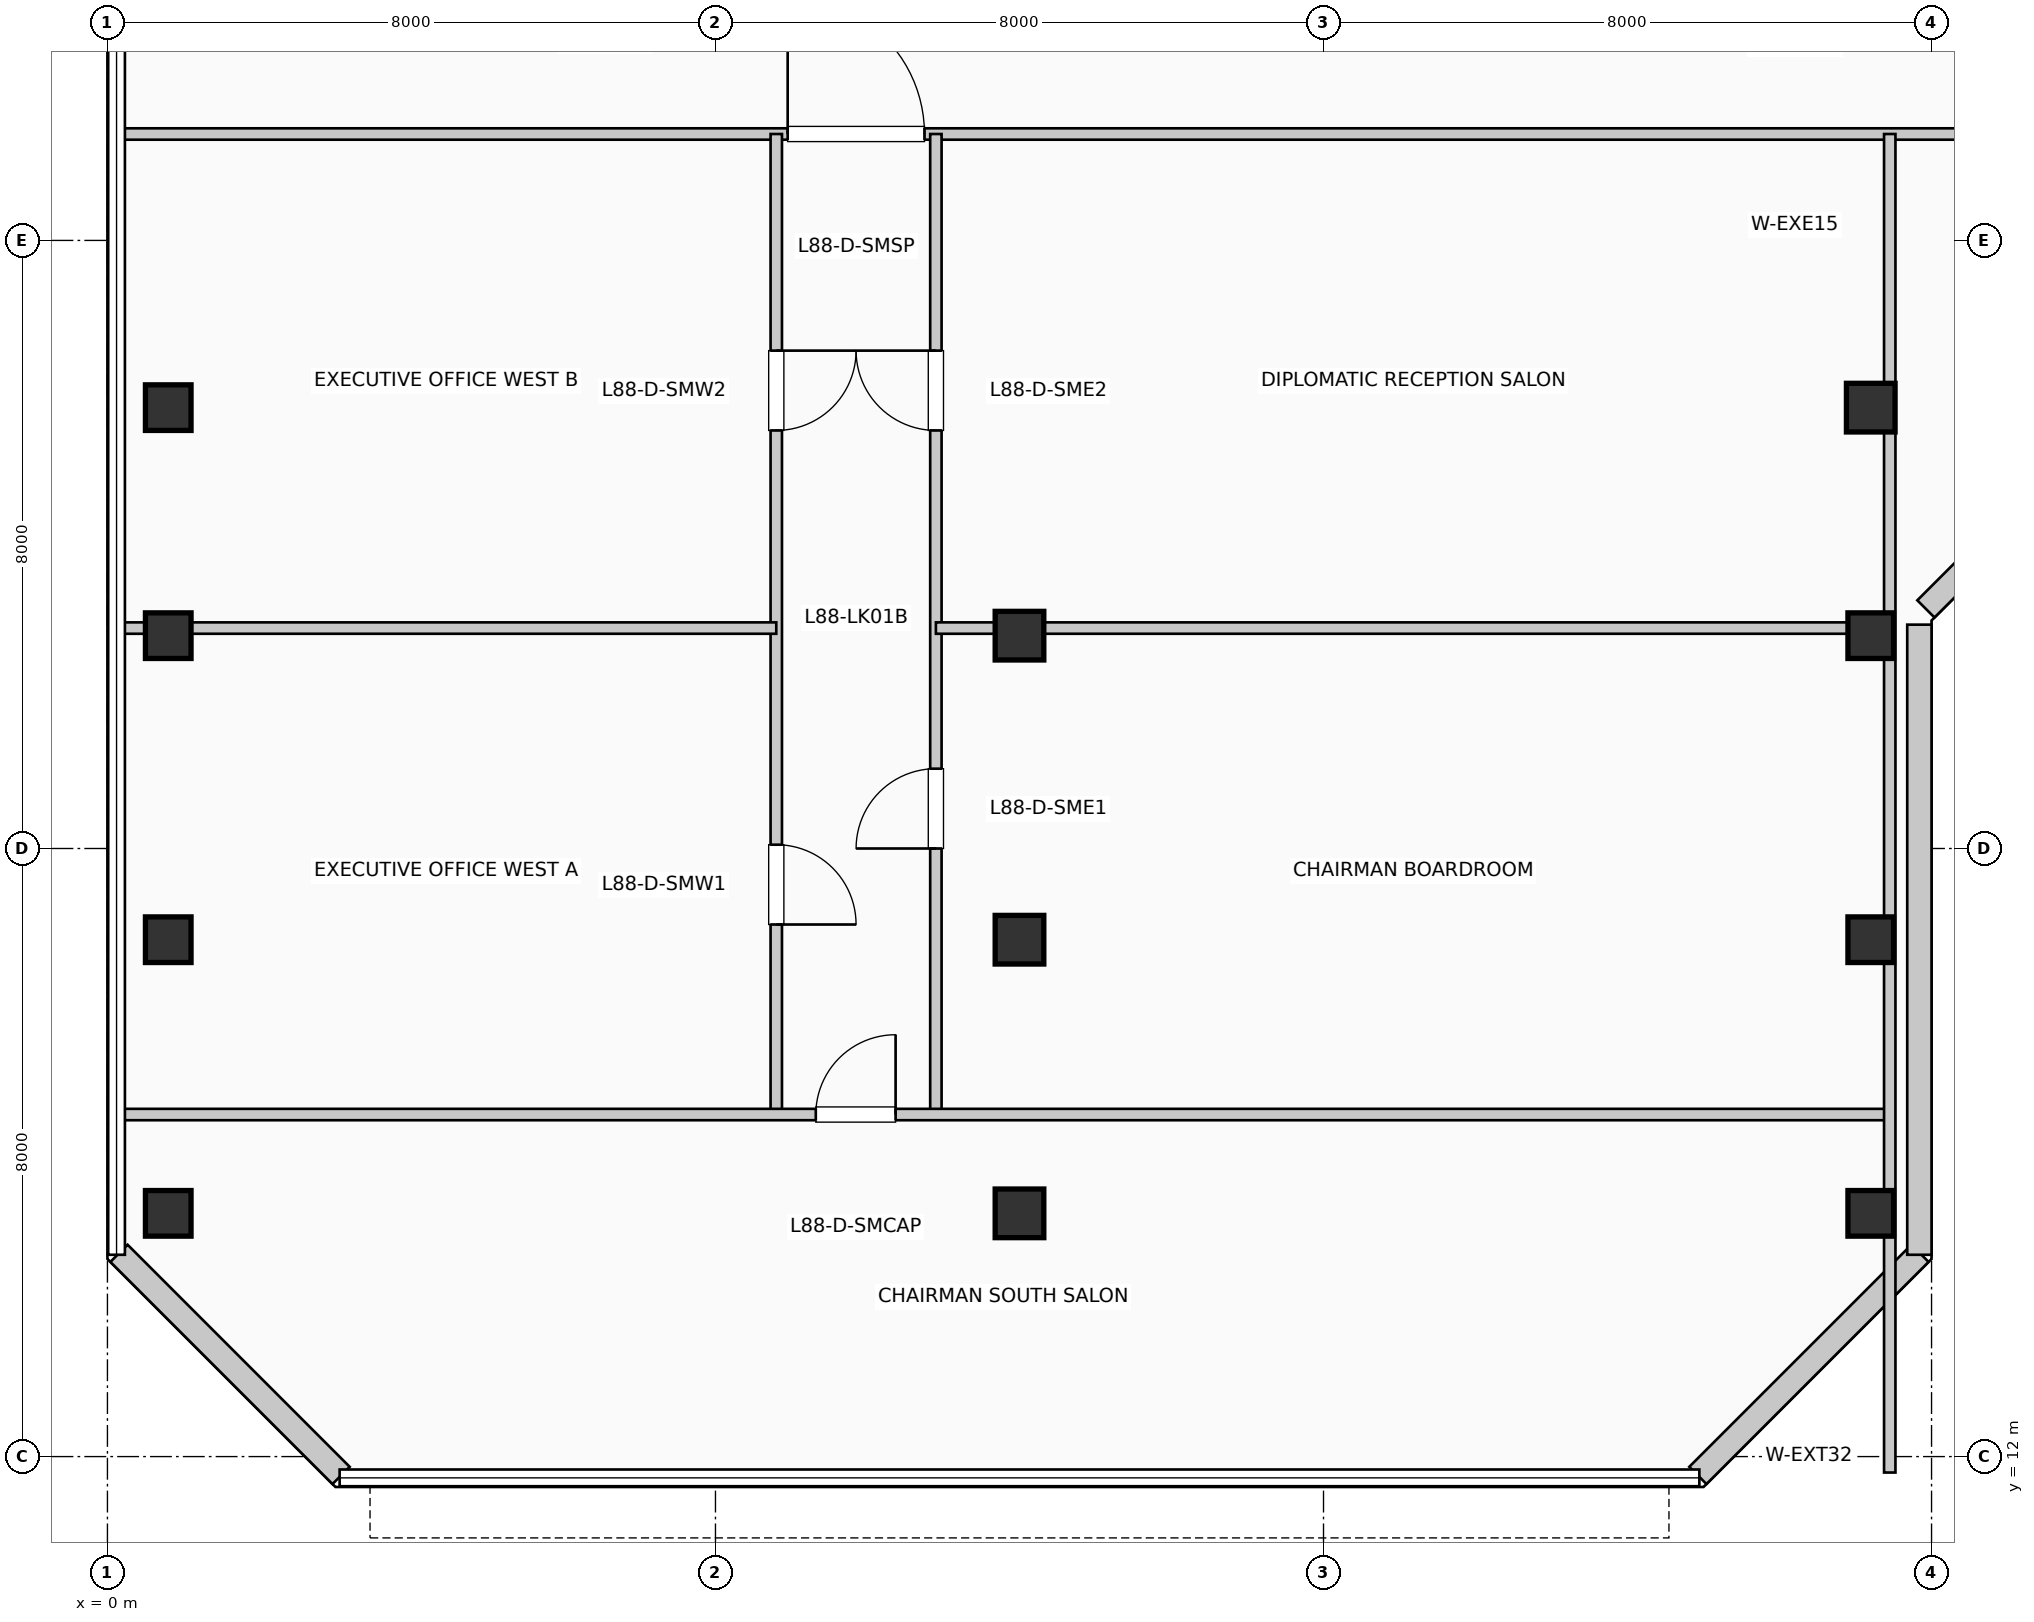
"""IFC4 building model, lengths in metres.
Left out: names, types, materials, properties, quantities, classifications, styles, units other than length and angle.
Written with IfcOpenShell. Run it as: python <this file> out.ifc"""

import sys

from ifc_helpers import new_model, si_unit, direction, frame, frame_2d, origin, origin_2d, place, context, subcontext, project, spatial, rectangle, extrude, element, fill, save


model = new_model("IFC4")
c1 = context("Model", 3, precision=1e-05, world=origin(), true_north=direction((0.0, 1.0)))
c2 = subcontext(c1, "Body", "Model", "MODEL_VIEW")
j1 = project(units=[si_unit("LENGTHUNIT", "METRE"), si_unit("PLANEANGLEUNIT", "RADIAN")], contexts=[c1])
p1 = place(None, origin())
s1 = spatial("IfcSite", under=j1, at=p1, CompositionType="ELEMENT")
p2 = place(p1, origin())
s2 = spatial("IfcBuilding", under=s1, at=p2, CompositionType="ELEMENT")
p3 = place(p2, frame((0.0, 0.0, 361.35)))
s3 = spatial("IfcBuildingStorey", under=s2, at=p3, CompositionType="ELEMENT", Elevation=361.35)
for number, where, z_axis, x_axis in (
    (1, (0.8, 15.2, 0.0), (0.0, 0.0, 1.0), (1.0, 0.0, 0.0)),
    (2, (0.8, 18.8, 0.0), (0.0, 0.0, 1.0), (1.0, 0.0, 0.0)),
    (3, (0.8, 22.8, 0.0), (0.0, 0.0, 1.0), (1.0, 0.0, 0.0)),
    (4, (0.8, 25.8, 0.0), (0.0, 0.0, 1.0), (1.0, 0.0, 0.0)),
):
    element("IfcColumn", number, at=place(p3, frame(where, z_axis=z_axis, x_axis=x_axis)), inside=s3, PredefinedType="COLUMN", context=c2, shape_type="SweptSolid", body=[
        extrude(rectangle(XDim=0.6, YDim=0.6, at=origin_2d()), origin(), (0.0, 0.0, 1.0), 4.62),
    ])
for number, where, z_axis, x_axis in (
    (5, (12.0, 15.2, 0.0), (0.0, 0.0, 1.0), (1.0, 0.0, 0.0)),
    (6, (12.0, 18.8, 0.0), (0.0, 0.0, 1.0), (1.0, 0.0, 0.0)),
    (7, (12.0, 22.8, 0.0), (0.0, 0.0, 1.0), (1.0, 0.0, 0.0)),
):
    element("IfcColumn", number, at=place(p3, frame(where, z_axis=z_axis, x_axis=x_axis)), inside=s3, PredefinedType="COLUMN", context=c2, shape_type="SweptSolid", body=[
        extrude(rectangle(XDim=0.64, YDim=0.64, at=origin_2d()), origin(), (0.0, 0.0, 1.0), 4.62),
    ])
for number, where, z_axis, x_axis in (
    (8, (23.2, 15.2, 0.0), (0.0, 0.0, 1.0), (1.0, 0.0, 0.0)),
    (9, (23.2, 18.8, 0.0), (0.0, 0.0, 1.0), (1.0, 0.0, 0.0)),
    (10, (23.2, 22.8, 0.0), (0.0, 0.0, 1.0), (1.0, 0.0, 0.0)),
):
    element("IfcColumn", number, at=place(p3, frame(where, z_axis=z_axis, x_axis=x_axis)), inside=s3, PredefinedType="COLUMN", context=c2, shape_type="SweptSolid", body=[
        extrude(rectangle(XDim=0.6, YDim=0.6, at=origin_2d()), origin(), (0.0, 0.0, 1.0), 4.62),
    ])
p4 = place(p3, frame((23.2, 25.8, 0.0), z_axis=(0.0, 0.0, 1.0), x_axis=(1.0, 0.0, 0.0)))
e11 = element("IfcColumn", 11, at=p4, inside=s3, PredefinedType="COLUMN", context=c2, shape_type="SweptSolid", body=[
    extrude(rectangle(XDim=0.64, YDim=0.64, at=origin_2d()), origin(), (0.0, 0.0, 1.0), 4.62),
])
p5 = place(p3, frame((20.926, 11.752, 0.0), z_axis=(0.0, 0.0, 1.0), x_axis=(0.707077242712, 0.707136318428, 0.0)))
e12 = element("IfcWall", 12, at=p5, inside=s3, PredefinedType="SOLIDWALL", context=c2, shape_type="SweptSolid", body=[
    extrude(rectangle(XDim=4.133, YDim=0.32, at=frame_2d((2.066, 0.0))), origin(), (0.0, 0.0, 1.0), 4.27),
])
p6 = place(p3, frame((23.84, 14.655, 0.0), z_axis=(0.0, 0.0, 1.0), x_axis=(0.0, 1.0, 0.0)))
e13 = element("IfcWall", 13, at=p6, inside=s3, PredefinedType="SOLIDWALL", context=c2, shape_type="SweptSolid", body=[
    extrude(rectangle(XDim=8.29, YDim=0.32, at=frame_2d((4.145, 0.0))), origin(), (0.0, 0.0, 1.0), 4.27),
])
p7 = place(p3, frame((23.926, 23.152, 0.0), z_axis=(0.0, 0.0, 1.0), x_axis=(0.707106781187, 0.707106781187, 0.0)))
e14 = element("IfcWall", 14, at=p7, inside=s3, PredefinedType="SOLIDWALL", context=c2, shape_type="SweptSolid", body=[
    extrude(rectangle(XDim=2.718, YDim=0.32, at=frame_2d((1.359, 0.0))), origin(), (0.0, 0.0, 1.0), 4.27),
])
p8 = place(p3, frame((0.152, 14.674, 0.0), z_axis=(0.0, 0.0, 1.0), x_axis=(0.707077242712, -0.707136318428, 0.0)))
e15 = element("IfcWall", 15, at=p8, inside=s3, PredefinedType="SOLIDWALL", context=c2, shape_type="SweptSolid", body=[
    extrude(rectangle(XDim=4.133, YDim=0.32, at=frame_2d((2.066, 0.0))), origin(), (0.0, 0.0, 1.0), 4.27),
])
p9 = place(p3, frame((0.19, 29.4, 0.0), z_axis=(0.0, 0.0, 1.0), x_axis=(1.0, 0.0, 0.0)))
e16 = element("IfcWall", 16, at=p9, inside=s3, PredefinedType="PARTITIONING", context=c2, shape_type="SweptSolid", body=[
    extrude(rectangle(XDim=44.02, YDim=0.15, at=frame_2d((22.01, 0.0))), origin(), (0.0, 0.0, 1.0), 3.955),
])
p10 = place(p9, frame((8.76, 0.0, 0.0)))
e17 = element("IfcOpeningElement", 17, at=p10, cuts=e16, PredefinedType="OPENING", context=c2, shape_type="SweptSolid", body=[
    extrude(rectangle(XDim=1.8, YDim=2.3, at=frame_2d((0.9, 1.15))), frame((0.0, 0.085, 0.0), z_axis=(0.0, -1.0, 0.0), x_axis=(1.0, 0.0, 0.0)), (0.0, 0.0, 1.0), 0.17),
])
p11 = place(p9, frame((25.91, 0.0, 0.0)))
e18 = element("IfcOpeningElement", 18, at=p11, cuts=e16, PredefinedType="OPENING", context=c2, shape_type="SweptSolid", body=[
    extrude(rectangle(XDim=1.05, YDim=2.15, at=frame_2d((0.525, 1.075))), frame((0.0, 0.085, 0.0), z_axis=(0.0, -1.0, 0.0), x_axis=(1.0, 0.0, 0.0)), (0.0, 0.0, 1.0), 0.17),
])
p12 = place(p9, frame((36.01, 0.0, 0.0)))
e19 = element("IfcOpeningElement", 19, at=p12, cuts=e16, PredefinedType="OPENING", context=c2, shape_type="SweptSolid", body=[
    extrude(rectangle(XDim=1.05, YDim=2.15, at=frame_2d((0.525, 1.075))), frame((0.0, 0.085, 0.0), z_axis=(0.0, -1.0, 0.0), x_axis=(1.0, 0.0, 0.0)), (0.0, 0.0, 1.0), 0.17),
])
p13 = place(p3, frame((8.8, 16.5, 0.0), z_axis=(0.0, 0.0, 1.0), x_axis=(0.0, 1.0, 0.0)))
e20 = element("IfcWall", 20, at=p13, inside=s3, PredefinedType="PARTITIONING", context=c2, shape_type="SweptSolid", body=[
    extrude(rectangle(XDim=12.9, YDim=0.15, at=frame_2d((6.45, 0.0))), origin(), (0.0, 0.0, 1.0), 4.27),
])
p14 = place(p13, frame((3.55, 0.0, 0.0), z_axis=(0.0, 0.0, 1.0), x_axis=(-1.0, 0.0, 0.0)))
e21 = element("IfcOpeningElement", 21, at=p14, cuts=e20, PredefinedType="OPENING", context=c2, shape_type="SweptSolid", body=[
    extrude(rectangle(XDim=1.05, YDim=2.15, at=frame_2d((0.525, 1.075))), frame((0.0, 0.085, 0.0), z_axis=(0.0, -1.0, 0.0), x_axis=(1.0, 0.0, 0.0)), (0.0, 0.0, 1.0), 0.17),
])
p15 = place(p13, frame((10.05, 0.0, 0.0), z_axis=(0.0, 0.0, 1.0), x_axis=(-1.0, 0.0, 0.0)))
e22 = element("IfcOpeningElement", 22, at=p15, cuts=e20, PredefinedType="OPENING", context=c2, shape_type="SweptSolid", body=[
    extrude(rectangle(XDim=1.05, YDim=2.15, at=frame_2d((0.525, 1.075))), frame((0.0, 0.085, 0.0), z_axis=(0.0, -1.0, 0.0), x_axis=(1.0, 0.0, 0.0)), (0.0, 0.0, 1.0), 0.17),
])
p16 = place(p3, frame((10.9, 16.5, 0.0), z_axis=(0.0, 0.0, 1.0), x_axis=(0.0, 1.0, 0.0)))
e23 = element("IfcWall", 23, at=p16, inside=s3, PredefinedType="PARTITIONING", context=c2, shape_type="SweptSolid", body=[
    extrude(rectangle(XDim=12.9, YDim=0.15, at=frame_2d((6.45, 0.0))), origin(), (0.0, 0.0, 1.0), 4.27),
])
p17 = place(p16, frame((3.5, 0.0, 0.0)))
e24 = element("IfcOpeningElement", 24, at=p17, cuts=e23, PredefinedType="OPENING", context=c2, shape_type="SweptSolid", body=[
    extrude(rectangle(XDim=1.05, YDim=2.15, at=frame_2d((0.525, 1.075))), frame((0.0, 0.085, 0.0), z_axis=(0.0, -1.0, 0.0), x_axis=(1.0, 0.0, 0.0)), (0.0, 0.0, 1.0), 0.17),
])
p18 = place(p16, frame((9.0, 0.0, 0.0)))
e25 = element("IfcOpeningElement", 25, at=p18, cuts=e23, PredefinedType="OPENING", context=c2, shape_type="SweptSolid", body=[
    extrude(rectangle(XDim=1.05, YDim=2.15, at=frame_2d((0.525, 1.075))), frame((0.0, 0.085, 0.0), z_axis=(0.0, -1.0, 0.0), x_axis=(1.0, 0.0, 0.0)), (0.0, 0.0, 1.0), 0.17),
])
p19 = place(p3, frame((0.19, 16.5, 0.0), z_axis=(0.0, 0.0, 1.0), x_axis=(1.0, 0.0, 0.0)))
e26 = element("IfcWall", 26, at=p19, inside=s3, PredefinedType="PARTITIONING", context=c2, shape_type="SweptSolid", body=[
    extrude(rectangle(XDim=23.26, YDim=0.15, at=frame_2d((11.63, 0.0))), origin(), (0.0, 0.0, 1.0), 4.27),
])
p20 = place(p19, frame((9.13, 0.0, 0.0)))
e27 = element("IfcOpeningElement", 27, at=p20, cuts=e26, PredefinedType="OPENING", context=c2, shape_type="SweptSolid", body=[
    extrude(rectangle(XDim=1.05, YDim=2.15, at=frame_2d((0.525, 1.075))), frame((0.0, 0.085, 0.0), z_axis=(0.0, -1.0, 0.0), x_axis=(1.0, 0.0, 0.0)), (0.0, 0.0, 1.0), 0.17),
])
p21 = place(p3, frame((23.45, 11.79, 0.0), z_axis=(0.0, 0.0, 1.0), x_axis=(0.0, 1.0, 0.0)))
e28 = element("IfcWall", 28, at=p21, inside=s3, PredefinedType="PARTITIONING", context=c2, shape_type="SweptSolid", body=[
    extrude(rectangle(XDim=17.61, YDim=0.15, at=frame_2d((8.805, 0.0))), origin(), (0.0, 0.0, 1.0), 3.755),
])
p22 = place(p3, frame((0.19, 22.9, 0.0), z_axis=(0.0, 0.0, 1.0), x_axis=(1.0, 0.0, 0.0)))
e29 = element("IfcWall", 29, at=p22, inside=s3, PredefinedType="PARTITIONING", context=c2, shape_type="SweptSolid", body=[
    extrude(rectangle(XDim=8.61, YDim=0.15, at=frame_2d((4.305, 0.0))), origin(), (0.0, 0.0, 1.0), 3.755),
])
p23 = place(p3, frame((10.9, 22.9, 0.0), z_axis=(0.0, 0.0, 1.0), x_axis=(1.0, 0.0, 0.0)))
e30 = element("IfcWall", 30, at=p23, inside=s3, PredefinedType="PARTITIONING", context=c2, shape_type="SweptSolid", body=[
    extrude(rectangle(XDim=12.55, YDim=0.15, at=frame_2d((6.275, 0.0))), origin(), (0.0, 0.0, 1.0), 3.755),
])
p24 = place(p10, origin())
e31 = element("IfcDoor", 31, at=p24, inside=s3, OperationType="SINGLE_SWING_LEFT", PredefinedType="DOOR", context=c2, shape_type="SweptSolid", body=[
    extrude(rectangle(XDim=1.8, YDim=2.3, at=frame_2d((0.9, 1.15))), frame((0.0, 0.025, 0.0), z_axis=(0.0, -1.0, 0.0), x_axis=(1.0, 0.0, 0.0)), (0.0, 0.0, 1.0), 0.05),
])
fill(e17, e31)
p25 = place(p20, origin())
e32 = element("IfcDoor", 32, at=p25, inside=s3, OperationType="SINGLE_SWING_RIGHT", PredefinedType="DOOR", context=c2, shape_type="SweptSolid", body=[
    extrude(rectangle(XDim=1.05, YDim=2.15, at=frame_2d((0.525, 1.075))), frame((0.0, 0.025, 0.0), z_axis=(0.0, -1.0, 0.0), x_axis=(1.0, 0.0, 0.0)), (0.0, 0.0, 1.0), 0.05),
])
fill(e27, e32)
p26 = place(p14, origin())
e33 = element("IfcDoor", 33, at=p26, inside=s3, OperationType="SINGLE_SWING_LEFT", PredefinedType="DOOR", context=c2, shape_type="SweptSolid", body=[
    extrude(rectangle(XDim=1.05, YDim=2.15, at=frame_2d((0.525, 1.075))), frame((0.0, 0.025, 0.0), z_axis=(0.0, -1.0, 0.0), x_axis=(1.0, 0.0, 0.0)), (0.0, 0.0, 1.0), 0.05),
])
fill(e21, e33)
p27 = place(p15, origin())
e34 = element("IfcDoor", 34, at=p27, inside=s3, OperationType="SINGLE_SWING_RIGHT", PredefinedType="DOOR", context=c2, shape_type="SweptSolid", body=[
    extrude(rectangle(XDim=1.05, YDim=2.15, at=frame_2d((0.525, 1.075))), frame((0.0, 0.025, 0.0), z_axis=(0.0, -1.0, 0.0), x_axis=(1.0, 0.0, 0.0)), (0.0, 0.0, 1.0), 0.05),
])
fill(e22, e34)
p28 = place(p17, origin())
e35 = element("IfcDoor", 35, at=p28, inside=s3, OperationType="SINGLE_SWING_LEFT", PredefinedType="DOOR", context=c2, shape_type="SweptSolid", body=[
    extrude(rectangle(XDim=1.05, YDim=2.15, at=frame_2d((0.525, 1.075))), frame((0.0, 0.025, 0.0), z_axis=(0.0, -1.0, 0.0), x_axis=(1.0, 0.0, 0.0)), (0.0, 0.0, 1.0), 0.05),
])
fill(e24, e35)
p29 = place(p18, origin())
e36 = element("IfcDoor", 36, at=p29, inside=s3, OperationType="SINGLE_SWING_RIGHT", PredefinedType="DOOR", context=c2, shape_type="SweptSolid", body=[
    extrude(rectangle(XDim=1.05, YDim=2.15, at=frame_2d((0.525, 1.075))), frame((0.0, 0.025, 0.0), z_axis=(0.0, -1.0, 0.0), x_axis=(1.0, 0.0, 0.0)), (0.0, 0.0, 1.0), 0.05),
])
fill(e25, e36)
save(model, sys.argv[1])
